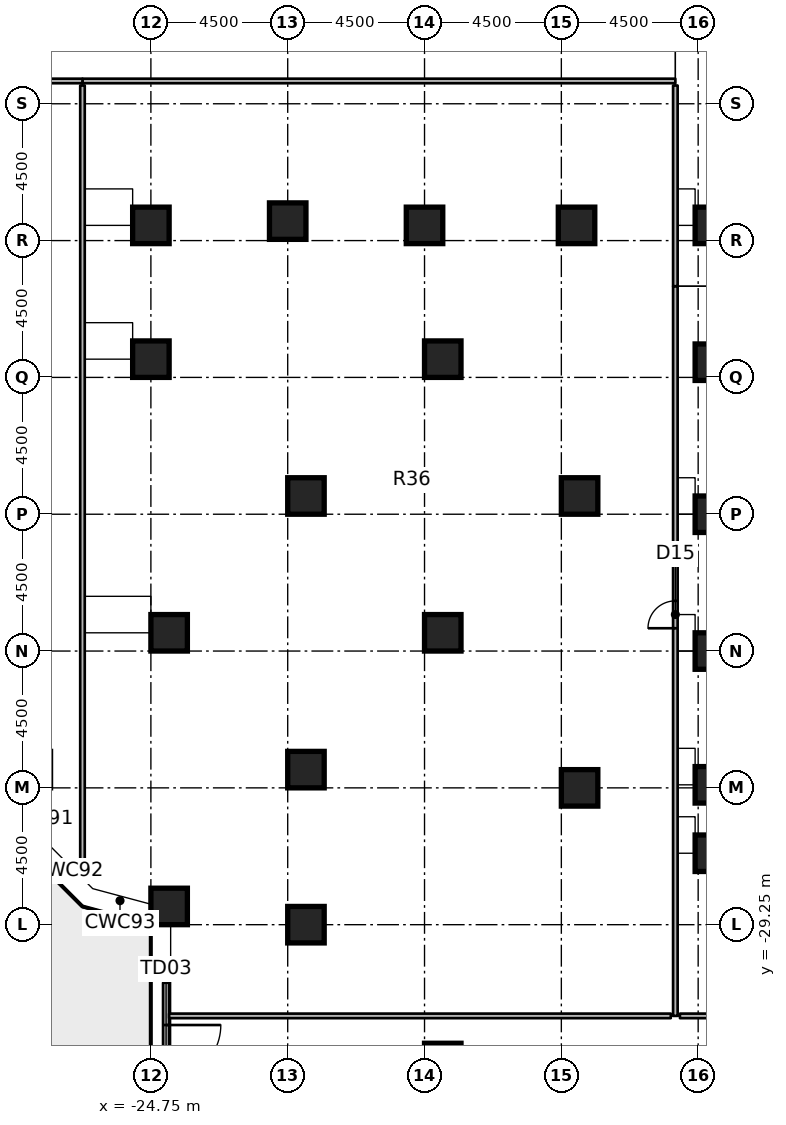
"""IFC4 building model, lengths in metres.
Left out: names, types, materials, properties, quantities, classifications, styles, units other than length and angle.
Written with IfcOpenShell. Run it as: python <this file> out.ifc"""

import sys

from ifc_helpers import new_model, si_unit, direction, frame, frame_2d, origin, origin_2d, place, context, subcontext, project, spatial, rectangle, extrude, element, fill, save


model = new_model("IFC4")
c1 = context("Model", 3, precision=1e-05, world=origin(), true_north=direction((0.0, 1.0)))
c2 = subcontext(c1, "Body", "Model", "MODEL_VIEW")
j1 = project(units=[si_unit("LENGTHUNIT", "METRE"), si_unit("PLANEANGLEUNIT", "RADIAN")], contexts=[c1])
p1 = place(None, origin())
s1 = spatial("IfcSite", under=j1, at=p1, CompositionType="ELEMENT")
p2 = place(p1, origin())
s2 = spatial("IfcBuilding", under=s1, at=p2, CompositionType="ELEMENT")
p3 = place(p2, frame((0.0, 0.0, 7.0)))
s3 = spatial("IfcBuildingStorey", under=s2, at=p3, CompositionType="ELEMENT", Elevation=7.0)
for number, where, z_axis, x_axis in (
    (1, (-24.15, -28.65, 0.0), (0.0, 0.0, 1.0), (1.0, 0.0, 0.0)),
    (2, (-24.15, -19.65, 0.0), (0.0, 0.0, 1.0), (1.0, 0.0, 0.0)),
    (3, (-24.75, -10.65, 0.0), (0.0, 0.0, 1.0), (1.0, 0.0, 0.0)),
    (4, (-24.75, -6.25, 0.0), (0.0, 0.0, 1.0), (1.0, 0.0, 0.0)),
    (5, (-19.65, -29.25, 0.0), (0.0, 0.0, 1.0), (1.0, 0.0, 0.0)),
    (6, (-19.65, -24.15, 0.0), (0.0, 0.0, 1.0), (1.0, 0.0, 0.0)),
    (7, (-19.65, -15.15, 0.0), (0.0, 0.0, 1.0), (1.0, 0.0, 0.0)),
    (8, (-20.25, -6.11, 0.0), (0.0, 0.0, 1.0), (1.0, 0.0, 0.0)),
    (9, (-15.15, -33.75, 0.0), (0.0, 0.0, 1.0), (1.0, 0.0, 0.0)),
    (10, (-15.15, -19.65, 0.0), (0.0, 0.0, 1.0), (1.0, 0.0, 0.0)),
    (11, (-15.15, -10.65, 0.0), (0.0, 0.0, 1.0), (1.0, 0.0, 0.0)),
    (12, (-15.75, -6.25, 0.0), (0.0, 0.0, 1.0), (1.0, 0.0, 0.0)),
    (13, (-10.65, -24.75, 0.0), (0.0, 0.0, 1.0), (1.0, 0.0, 0.0)),
    (14, (-10.65, -15.15, 0.0), (0.0, 0.0, 1.0), (1.0, 0.0, 0.0)),
    (15, (-10.75, -6.25, 0.0), (0.0, 0.0, 1.0), (1.0, 0.0, 0.0)),
    (16, (-6.25, -26.9, 0.0), (0.0, 0.0, 1.0), (1.0, 0.0, 0.0)),
    (17, (-6.25, -24.65, 0.0), (0.0, 0.0, 1.0), (1.0, 0.0, 0.0)),
    (18, (-6.25, -20.25, 0.0), (0.0, 0.0, 1.0), (1.0, 0.0, 0.0)),
    (19, (-6.25, -15.75, 0.0), (0.0, 0.0, 1.0), (1.0, 0.0, 0.0)),
    (20, (-6.25, -10.75, 0.0), (0.0, 0.0, 1.0), (1.0, 0.0, 0.0)),
    (21, (-6.25, -6.25, 0.0), (0.0, 0.0, 1.0), (1.0, 0.0, 0.0)),
):
    element("IfcColumn", number, at=place(p3, frame(where, z_axis=z_axis, x_axis=x_axis)), inside=s3, PredefinedType="COLUMN", context=c2, shape_type="SweptSolid", body=[
        extrude(rectangle(XDim=1.2, YDim=1.2, at=origin_2d()), origin(), (0.0, 0.0, 1.0), 4.55),
    ])
p4 = place(p3, frame((-24.25, -31.16, 0.0), z_axis=(0.0, 0.0, 1.0), x_axis=(0.0, -1.0, 0.0)))
e22 = element("IfcWall", 22, at=p4, inside=s3, PredefinedType="SOLIDWALL", context=c2, shape_type="SweptSolid", body=[
    extrude(rectangle(XDim=4.58, YDim=0.2, at=frame_2d((2.29, 0.0))), origin(), (0.0, 0.0, 1.0), 4.55),
])
p5 = place(p4, frame((1.39, 0.0, 0.0)))
e23 = element("IfcOpeningElement", 23, at=p5, cuts=e22, PredefinedType="OPENING", context=c2, shape_type="SweptSolid", body=[
    extrude(rectangle(XDim=1.8, YDim=2.4, at=frame_2d((0.9, 1.2))), frame((0.0, 0.11, 0.0), z_axis=(0.0, -1.0, 0.0), x_axis=(1.0, 0.0, 0.0)), (0.0, 0.0, 1.0), 0.22),
])
p6 = place(p3, frame((-7.5, -32.25, 0.0), z_axis=(0.0, 0.0, 1.0), x_axis=(0.0, 1.0, 0.0)))
e24 = element("IfcWall", 24, at=p6, inside=s3, PredefinedType="PARTITIONING", context=c2, shape_type="SweptSolid", body=[
    extrude(rectangle(XDim=24.0, YDim=0.15, at=frame_2d((12.0, 0.0))), origin(), (0.0, 0.0, 1.0), 4.55),
])
p7 = place(p6, frame((12.75, 0.0, 0.0)))
e25 = element("IfcOpeningElement", 25, at=p7, cuts=e24, PredefinedType="OPENING", context=c2, shape_type="SweptSolid", body=[
    extrude(rectangle(XDim=0.9, YDim=2.1, at=frame_2d((0.45, 1.05))), frame((0.0, 0.085, 0.0), z_axis=(0.0, -1.0, 0.0), x_axis=(1.0, 0.0, 0.0)), (0.0, 0.0, 1.0), 0.17),
])
p8 = place(p3, frame((-1.5, -32.25, 0.0), z_axis=(0.0, 0.0, 1.0), x_axis=(-1.0, 0.0, 0.0)))
e26 = element("IfcWall", 26, at=p8, inside=s3, PredefinedType="PARTITIONING", context=c2, shape_type="SweptSolid", body=[
    extrude(rectangle(XDim=5.85, YDim=0.15, at=frame_2d((2.925, 0.0))), origin(), (0.0, 0.0, 1.0), 4.55),
])
p9 = place(p3, frame((-7.5, -1.5, 0.0), z_axis=(0.0, 0.0, 1.0), x_axis=(-1.0, 0.0, 0.0)))
e27 = element("IfcWall", 27, at=p9, inside=s3, PredefinedType="PARTITIONING", context=c2, shape_type="SweptSolid", body=[
    extrude(rectangle(XDim=19.5, YDim=0.15, at=frame_2d((9.75, 0.0))), origin(), (0.0, 0.0, 1.0), 4.55),
])
p10 = place(p3, frame((-27.0, -1.5, 0.0), z_axis=(0.0, 0.0, 1.0), x_axis=(-1.0, 0.0, 0.0)))
e28 = element("IfcWall", 28, at=p10, inside=s3, PredefinedType="PARTITIONING", context=c2, shape_type="SweptSolid", body=[
    extrude(rectangle(XDim=8.25, YDim=0.15, at=frame_2d((4.125, 0.0))), origin(), (0.0, 0.0, 1.0), 4.55),
])
p11 = place(p10, frame((3.675, 0.0, 0.0)))
e29 = element("IfcOpeningElement", 29, at=p11, cuts=e28, PredefinedType="OPENING", context=c2, shape_type="SweptSolid", body=[
    extrude(rectangle(XDim=0.9, YDim=2.1, at=frame_2d((0.45, 1.05))), frame((0.0, 0.085, 0.0), z_axis=(0.0, -1.0, 0.0), x_axis=(1.0, 0.0, 0.0)), (0.0, 0.0, 1.0), 0.17),
])
p12 = place(p3, frame((-27.0, -27.797, 0.0), z_axis=(0.0, 0.0, 1.0), x_axis=(0.0, 1.0, 0.0)))
e30 = element("IfcWall", 30, at=p12, inside=s3, PredefinedType="PARTITIONING", context=c2, shape_type="SweptSolid", body=[
    extrude(rectangle(XDim=26.147, YDim=0.15, at=frame_2d((13.074, 0.0))), origin(), (0.0, 0.0, 1.0), 4.55),
])
p13 = place(p3, frame((-7.65, -32.25, 0.0), z_axis=(0.0, 0.0, 1.0), x_axis=(-1.0, 0.0, 0.0)))
e31 = element("IfcWall", 31, at=p13, inside=s3, PredefinedType="PARTITIONING", context=c2, shape_type="SweptSolid", body=[
    extrude(rectangle(XDim=16.5, YDim=0.15, at=frame_2d((8.25, 0.0))), origin(), (0.0, 0.0, 1.0), 4.55),
])
p14 = place(p3, frame((-7.5, -1.65, 0.0), z_axis=(0.0, 0.0, 1.0), x_axis=(0.0, -1.0, 0.0)))
e32 = element("IfcWall", 32, at=p14, inside=s3, PredefinedType="PARTITIONING", context=c2, shape_type="SweptSolid", body=[
    extrude(rectangle(XDim=6.6, YDim=0.15, at=frame_2d((3.3, 0.0))), origin(), (0.0, 0.0, 1.0), 4.55),
])
p15 = place(p5, origin())
e33 = element("IfcDoor", 33, at=p15, inside=s3, OperationType="SINGLE_SWING_LEFT", PredefinedType="DOOR", context=c2, shape_type="SweptSolid", body=[
    extrude(rectangle(XDim=1.8, YDim=2.4, at=frame_2d((0.9, 1.2))), frame((0.0, 0.025, 0.0), z_axis=(0.0, -1.0, 0.0), x_axis=(1.0, 0.0, 0.0)), (0.0, 0.0, 1.0), 0.05),
])
fill(e23, e33)
p16 = place(p7, origin())
e34 = element("IfcDoor", 34, at=p16, inside=s3, OperationType="SINGLE_SWING_LEFT", PredefinedType="DOOR", context=c2, shape_type="SweptSolid", body=[
    extrude(rectangle(XDim=0.9, YDim=2.1, at=frame_2d((0.45, 1.05))), frame((0.0, 0.025, 0.0), z_axis=(0.0, -1.0, 0.0), x_axis=(1.0, 0.0, 0.0)), (0.0, 0.0, 1.0), 0.05),
])
fill(e25, e34)
save(model, sys.argv[1])
